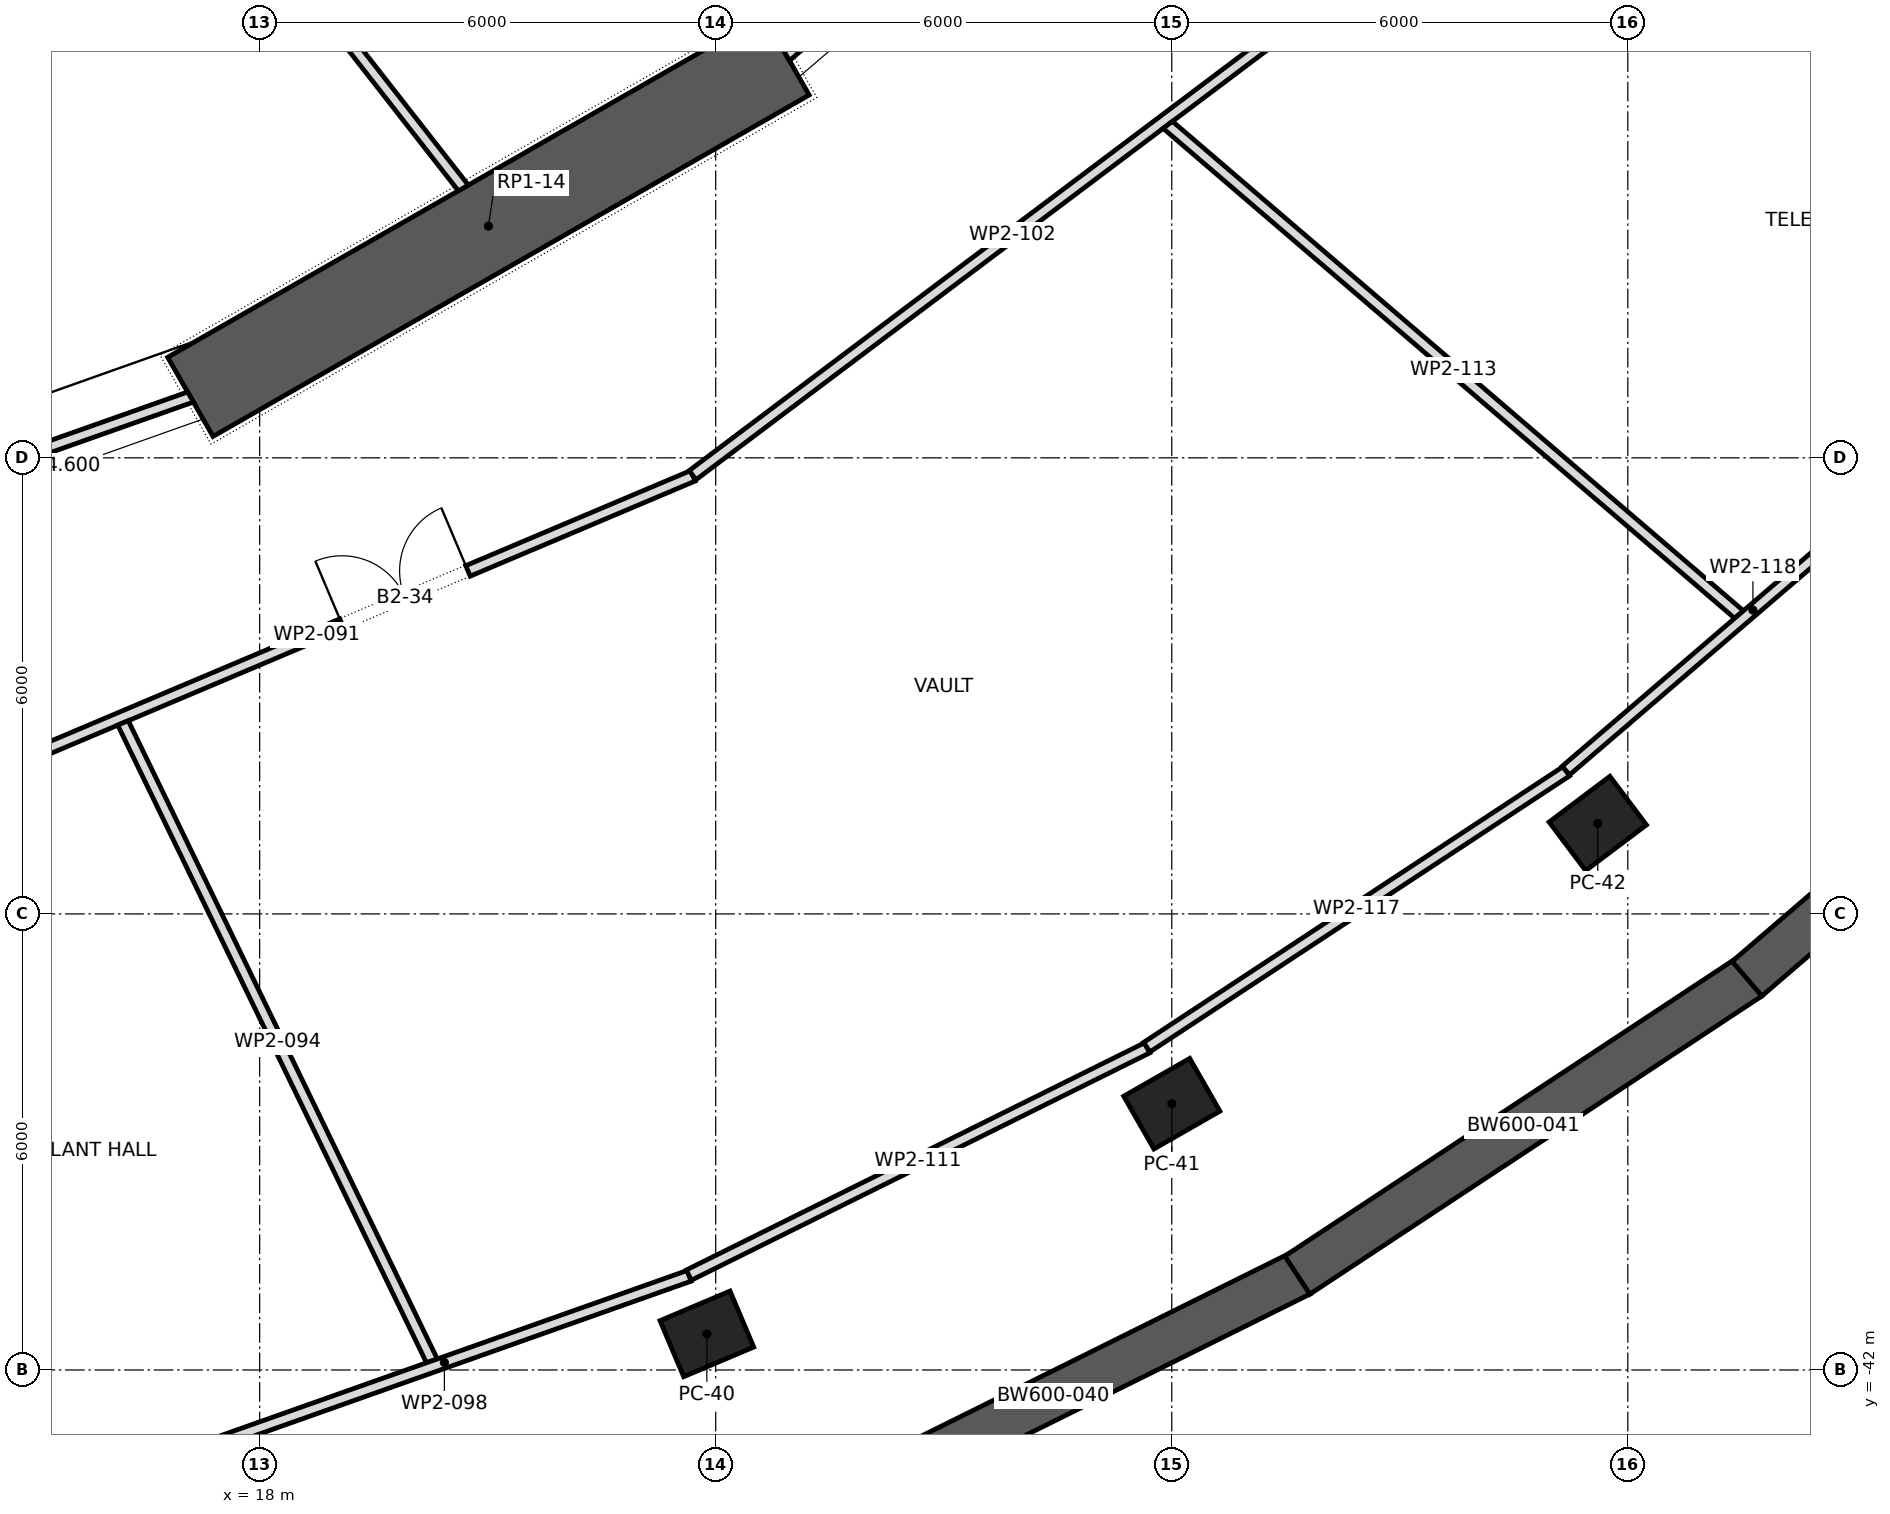
"""IFC4 building model, lengths in metres.
Left out: names, types, materials, properties, quantities, classifications, styles, units other than length and angle.
Written with IfcOpenShell. Run it as: python <this file> out.ifc"""

import sys

from ifc_helpers import new_model, si_unit, direction, frame, frame_2d, origin, origin_2d, place, context, subcontext, project, spatial, polyline, rectangle, outline, extrude, element, fill, save


model = new_model("IFC4")
c1 = context("Model", 3, precision=1e-05, world=origin(), true_north=direction((0.0, 1.0)))
c2 = subcontext(c1, "Body", "Model", "MODEL_VIEW")
j1 = project(units=[si_unit("LENGTHUNIT", "METRE"), si_unit("PLANEANGLEUNIT", "RADIAN")], contexts=[c1])
p1 = place(None, origin())
s1 = spatial("IfcSite", under=j1, at=p1, CompositionType="ELEMENT")
p2 = place(p1, origin())
s2 = spatial("IfcBuilding", under=s1, at=p2, CompositionType="ELEMENT")
p3 = place(p2, frame((0.0, 0.0, -9.5)))
s3 = spatial("IfcBuildingStorey", under=s2, at=p3, CompositionType="ELEMENT", Elevation=-9.5)
for number, where, z_axis, x_axis in (
    (1, (23.884, -41.525, 0.0), (0.0, 0.0, 1.0), (0.921, 0.389, 0.0)),
    (2, (30.001, -38.497, 0.0), (0.0, 0.0, 1.0), (0.868, 0.497, 0.0)),
    (3, (35.605, -34.81, 0.0), (0.0, 0.0, 1.0), (0.799, 0.601, 0.0)),
):
    element("IfcColumn", number, at=place(p3, frame(where, z_axis=z_axis, x_axis=x_axis)), inside=s3, PredefinedType="COLUMN", context=c2, shape_type="SweptSolid", body=[
        extrude(rectangle(XDim=1.0, YDim=0.8, at=origin_2d()), origin(), (0.0, 0.0, 1.0), 5.5),
    ])
p4 = place(p3, frame((17.089, -29.198, 0.0), z_axis=(0.0, 0.0, 1.0), x_axis=(0.867760656864, 0.496982336103, 0.0)))
e4 = element("IfcWall", 4, at=p4, inside=s3, PredefinedType="SHEAR", context=c2, shape_type="SweptSolid", body=[
    extrude(rectangle(XDim=9.038, YDim=1.2, at=frame_2d((4.519, 0.0))), origin(), (0.0, 0.0, 1.0), 5.5),
])
p5 = place(p3, frame((25.195, -43.955, 0.0), z_axis=(0.0, 0.0, 1.0), x_axis=(0.895750986496, 0.44455614965, 0.0)))
e5 = element("IfcWall", 5, at=p5, inside=s3, PredefinedType="SOLIDWALL", context=c2, shape_type="SweptSolid", body=[
    extrude(rectangle(XDim=7.245, YDim=0.6, at=frame_2d((3.623, 0.0))), origin(), (0.0, 0.0, 1.0), 5.5),
])
p6 = place(p3, frame((31.652, -40.752, 0.0), z_axis=(0.0, 0.0, 1.0), x_axis=(0.834745196239, 0.550636411215, 0.0)))
e6 = element("IfcWall", 6, at=p6, inside=s3, PredefinedType="SOLIDWALL", context=c2, shape_type="SweptSolid", body=[
    extrude(rectangle(XDim=7.124, YDim=0.6, at=frame_2d((3.562, 0.0))), origin(), (0.0, 0.0, 1.0), 5.5),
])
p7 = place(p3, frame((37.568, -36.853, 0.0), z_axis=(0.0, 0.0, 1.0), x_axis=(0.758319142722, 0.65188348482, 0.0)))
e7 = element("IfcWall", 7, at=p7, inside=s3, PredefinedType="SOLIDWALL", context=c2, shape_type="SweptSolid", body=[
    extrude(rectangle(XDim=6.991, YDim=0.6, at=frame_2d((3.496, 0.0))), origin(), (0.0, 0.0, 1.0), 5.5),
])
p8 = place(p3, frame((11.788, -15.074, 0.0), z_axis=(0.0, 0.0, 1.0), x_axis=(0.615848120598, -0.787864894735, 0.0)))
e8 = element("IfcWall", 8, at=p8, inside=s3, PredefinedType="PARTITIONING", context=c2, shape_type="SweptSolid", body=[
    extrude(outline(polyline([(0.0, -0.075), (14.428, -0.075), (14.449, 0.075), (0.0, 0.075), (0.0, -0.075)])), origin(), (0.0, 0.0, 1.0), 5.05),
])
p9 = place(p3, frame((11.967, -31.011, 0.0), z_axis=(0.0, 0.0, 1.0), x_axis=(0.942814385805, 0.333318217204, 0.0)))
e9 = element("IfcWall", 9, at=p9, inside=s3, PredefinedType="PARTITIONING", context=c2, shape_type="SweptSolid", body=[
    extrude(outline(polyline([(-0.013, -0.075), (5.448, -0.075), (5.421, 0.075), (0.013, 0.075), (-0.013, -0.075)])), origin(), (0.0, 0.0, 1.0), 4.6),
])
p10 = place(p3, frame((13.802, -34.421, 0.0), z_axis=(0.0, 0.0, 1.0), x_axis=(0.921072890143, 0.389390204094, 0.0)))
e10 = element("IfcWall", 10, at=p10, inside=s3, PredefinedType="PARTITIONING", context=c2, shape_type="SweptSolid", body=[
    extrude(rectangle(XDim=10.746, YDim=0.15, at=frame_2d((5.373, 0.0))), origin(), (0.0, 0.0, 1.0), 5.05),
])
p11 = place(p10, frame((5.733, 0.0, 0.0)))
e11 = element("IfcOpeningElement", 11, at=p11, cuts=e10, PredefinedType="OPENING", context=c2, shape_type="SweptSolid", body=[
    extrude(rectangle(XDim=1.8, YDim=2.1, at=frame_2d((0.9, 1.05))), frame((0.0, 0.087, 0.0), z_axis=(0.0, -1.0, 0.0), x_axis=(1.0, 0.0, 0.0)), (0.0, 0.0, 1.0), 0.174),
])
p12 = place(p3, frame((16.202, -33.487, 0.0), z_axis=(0.0, 0.0, 1.0), x_axis=(0.435783992342, -0.900051282994, 0.0)))
e12 = element("IfcWall", 12, at=p12, inside=s3, PredefinedType="PARTITIONING", context=c2, shape_type="SweptSolid", body=[
    extrude(outline(polyline([(-0.004, -0.075), (9.317, -0.075), (9.334, 0.075), (0.004, 0.075), (-0.004, -0.075)])), origin(), (0.0, 0.0, 1.0), 5.05),
])
p13 = place(p3, frame((17.211, -43.042, 0.0), z_axis=(0.0, 0.0, 1.0), x_axis=(0.94266330093, 0.333745263757, 0.0)))
e13 = element("IfcWall", 13, at=p13, inside=s3, PredefinedType="PARTITIONING", context=c2, shape_type="SweptSolid", body=[
    extrude(rectangle(XDim=6.832, YDim=0.15, at=frame_2d((3.416, 0.0))), origin(), (0.0, 0.0, 1.0), 5.05),
])
p14 = place(p3, frame((23.696, -30.228, 0.0), z_axis=(0.0, 0.0, 1.0), x_axis=(0.799195100787, 0.601071701944, 0.0)))
e14 = element("IfcWall", 14, at=p14, inside=s3, PredefinedType="PARTITIONING", context=c2, shape_type="SweptSolid", body=[
    extrude(rectangle(XDim=10.529, YDim=0.15, at=frame_2d((5.264, 0.0))), origin(), (0.0, 0.0, 1.0), 5.05),
])
p15 = place(p3, frame((24.932, -24.708, 0.0), z_axis=(0.0, 0.0, 1.0), x_axis=(0.760084552743, 0.649824185978, 0.0)))
e15 = element("IfcWall", 15, at=p15, inside=s3, PredefinedType="PARTITIONING", context=c2, shape_type="SweptSolid", body=[
    extrude(outline(polyline([(-0.014, -0.075), (5.09, -0.075), (5.06, 0.075), (0.014, 0.075), (-0.014, -0.075)])), origin(), (0.0, 0.0, 1.0), 4.6),
])
p16 = place(p3, frame((29.677, -37.762, 0.0), z_axis=(0.0, 0.0, 1.0), x_axis=(-0.895909442692, -0.444236727991, 0.0)))
e16 = element("IfcWall", 16, at=p16, inside=s3, PredefinedType="PARTITIONING", context=c2, shape_type="SweptSolid", body=[
    extrude(rectangle(XDim=6.731, YDim=0.15, at=frame_2d((3.365, 0.0))), origin(), (0.0, 0.0, 1.0), 5.05),
])
p17 = place(p3, frame((29.947, -25.619, 0.0), z_axis=(0.0, 0.0, 1.0), x_axis=(0.759265306208, -0.650781218836, 0.0)))
e17 = element("IfcWall", 17, at=p17, inside=s3, PredefinedType="PARTITIONING", context=c2, shape_type="SweptSolid", body=[
    extrude(outline(polyline([(-0.017, -0.075), (9.888, -0.075), (9.911, 0.075), (0.017, 0.075), (-0.017, -0.075)])), origin(), (0.0, 0.0, 1.0), 5.05),
])
p18 = place(p3, frame((35.191, -34.123, 0.0), z_axis=(0.0, 0.0, 1.0), x_axis=(-0.83553583791, -0.549435950378, 0.0)))
e18 = element("IfcWall", 18, at=p18, inside=s3, PredefinedType="PARTITIONING", context=c2, shape_type="SweptSolid", body=[
    extrude(rectangle(XDim=6.606, YDim=0.15, at=frame_2d((3.303, 0.0))), origin(), (0.0, 0.0, 1.0), 5.05),
])
p19 = place(p3, frame((35.185, -34.114, 0.0), z_axis=(0.0, 0.0, 1.0), x_axis=(0.759033312601, 0.651051787773, 0.0)))
e19 = element("IfcWall", 19, at=p19, inside=s3, PredefinedType="PARTITIONING", context=c2, shape_type="SweptSolid", body=[
    extrude(rectangle(XDim=6.484, YDim=0.15, at=frame_2d((3.242, 0.0))), origin(), (0.0, 0.0, 1.0), 5.05),
])
p20 = place(p11, origin())
e20 = element("IfcDoor", 20, at=p20, inside=s3, OperationType="DOUBLE_DOOR_SINGLE_SWING", PredefinedType="DOOR", context=c2, shape_type="SweptSolid", body=[
    extrude(rectangle(XDim=1.8, YDim=2.1, at=frame_2d((0.9, 1.05))), frame((0.0, 0.025, 0.0), z_axis=(0.0, -1.0, 0.0), x_axis=(1.0, 0.0, 0.0)), (0.0, 0.0, 1.0), 0.05),
])
fill(e11, e20)
save(model, sys.argv[1])
